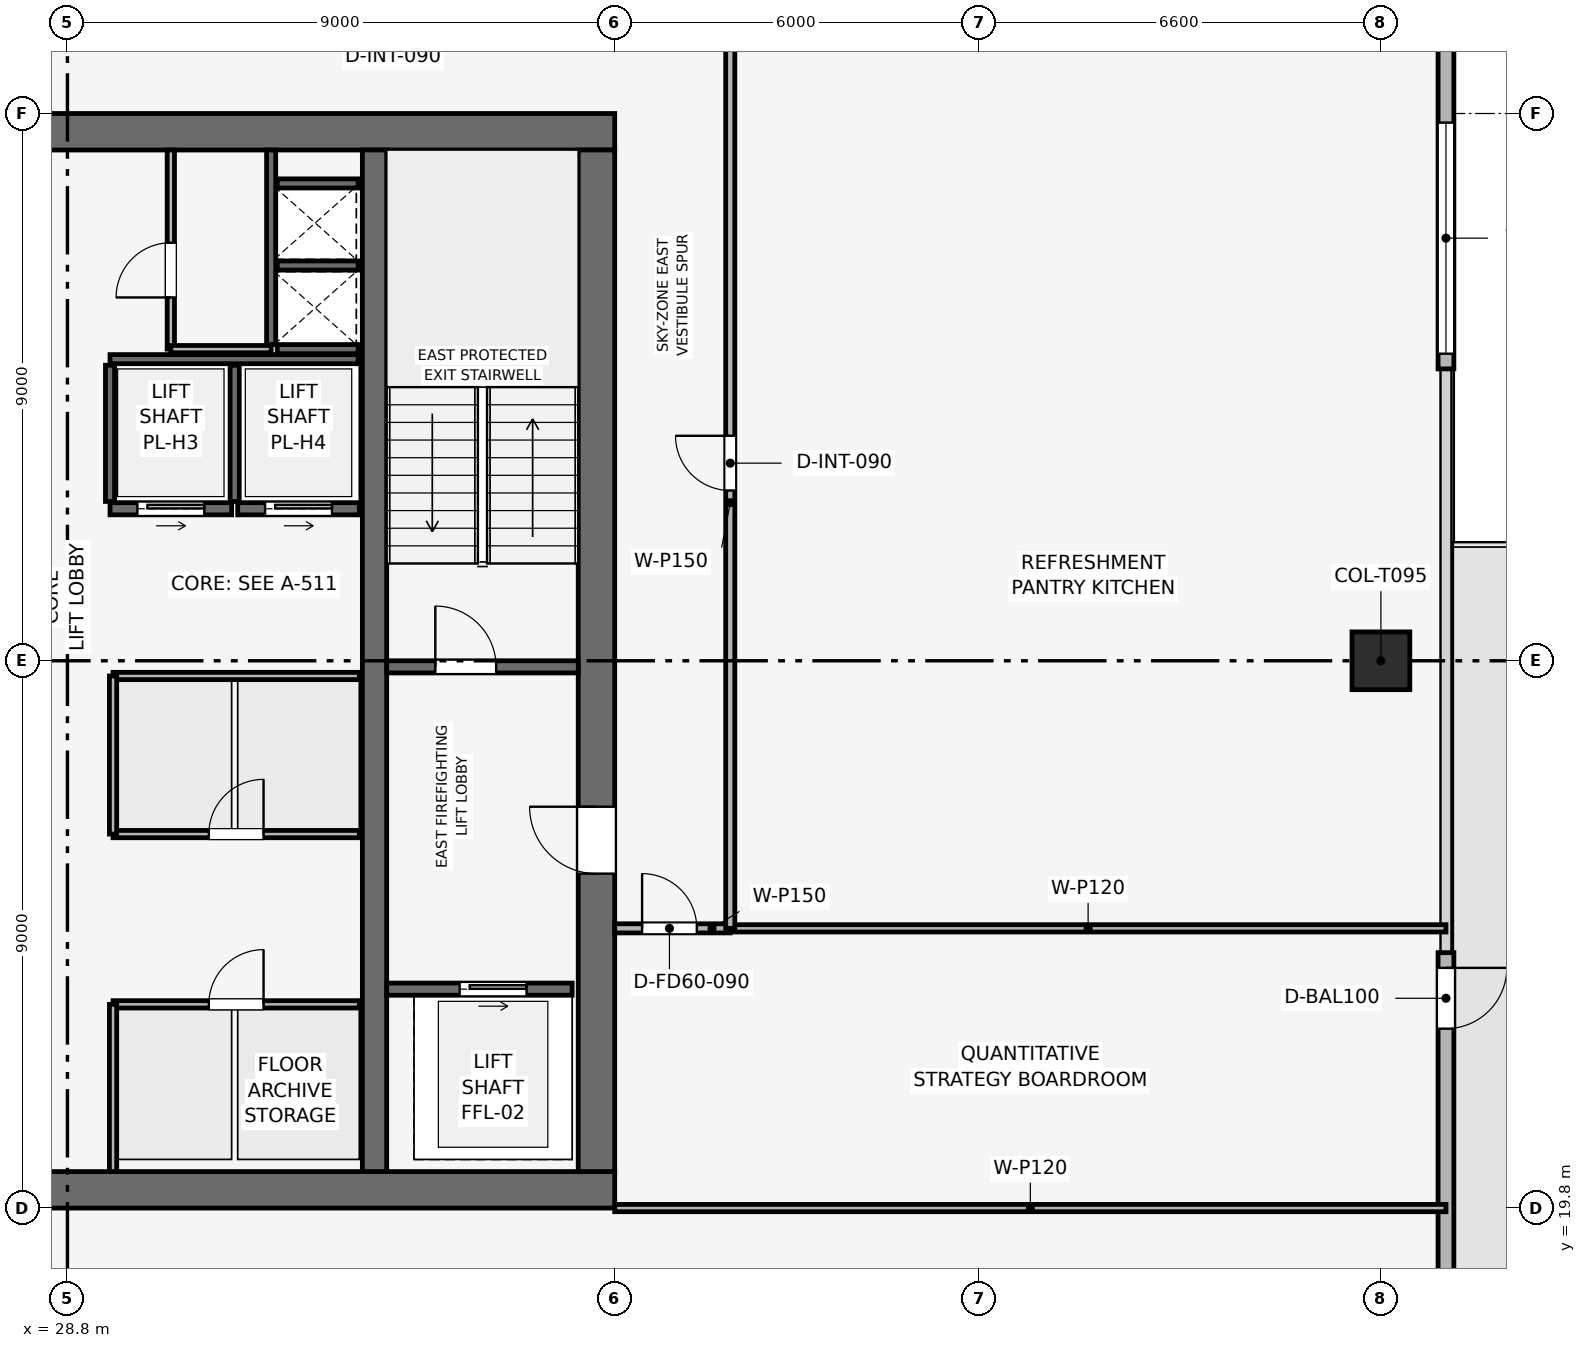
"""IFC4 building model, lengths in metres.
Left out: names, types, materials, properties, quantities, classifications, styles, units other than length and angle.
Written with IfcOpenShell. Run it as: python <this file> out.ifc"""

import sys

from ifc_helpers import new_model, si_unit, direction, frame, frame_2d, origin, origin_2d, place, context, subcontext, project, spatial, rectangle, extrude, element, fill, save


model = new_model("IFC4")
c1 = context("Model", 3, precision=1e-05, world=origin(), true_north=direction((0.0, 1.0)))
c2 = subcontext(c1, "Body", "Model", "MODEL_VIEW")
j1 = project(units=[si_unit("LENGTHUNIT", "METRE"), si_unit("PLANEANGLEUNIT", "RADIAN")], contexts=[c1])
p1 = place(None, origin())
s1 = spatial("IfcSite", under=j1, at=p1, CompositionType="ELEMENT")
p2 = place(p1, origin())
s2 = spatial("IfcBuilding", under=s1, at=p2, CompositionType="ELEMENT")
p3 = place(p2, frame((0.0, 0.0, 314.25)))
s3 = spatial("IfcBuildingStorey", under=s2, at=p3, CompositionType="ELEMENT", Elevation=314.25)
p4 = place(p3, frame((19.8, 20.1, 0.0), z_axis=(0.0, 0.0, 1.0), x_axis=(1.0, 0.0, 0.0)))
e1 = element("IfcWall", 1, at=p4, inside=s3, PredefinedType="SHEAR", context=c2, shape_type="SweptSolid", body=[
    extrude(rectangle(XDim=18.0, YDim=0.6, at=frame_2d((9.0, 0.0))), origin(), (0.0, 0.0, 1.0), 3.75),
])
p5 = place(p3, frame((19.8, 37.5, 0.0), z_axis=(0.0, 0.0, 1.0), x_axis=(1.0, 0.0, 0.0)))
e2 = element("IfcWall", 2, at=p5, inside=s3, PredefinedType="SHEAR", context=c2, shape_type="SweptSolid", body=[
    extrude(rectangle(XDim=18.0, YDim=0.6, at=frame_2d((9.0, 0.0))), origin(), (0.0, 0.0, 1.0), 3.75),
])
p6 = place(p5, frame((7.05, 0.0, 0.0)))
e3 = element("IfcOpeningElement", 3, at=p6, cuts=e2, PredefinedType="OPENING", context=c2, shape_type="SweptSolid", body=[
    extrude(rectangle(XDim=1.1, YDim=2.15, at=frame_2d((0.55, 1.075))), frame((0.0, 0.31, 0.0), z_axis=(0.0, -1.0, 0.0), x_axis=(1.0, 0.0, 0.0)), (0.0, 0.0, 1.0), 0.62),
])
p7 = place(p3, frame((37.5, 20.4, 0.0), z_axis=(0.0, 0.0, 1.0), x_axis=(0.0, 1.0, 0.0)))
e4 = element("IfcWall", 4, at=p7, inside=s3, PredefinedType="SHEAR", context=c2, shape_type="SweptSolid", body=[
    extrude(rectangle(XDim=16.8, YDim=0.6, at=frame_2d((8.4, 0.0))), origin(), (0.0, 0.0, 1.0), 3.75),
])
p8 = place(p7, frame((4.9, 0.0, 0.0)))
e5 = element("IfcOpeningElement", 5, at=p8, cuts=e4, PredefinedType="OPENING", context=c2, shape_type="SweptSolid", body=[
    extrude(rectangle(XDim=1.1, YDim=2.15, at=frame_2d((0.55, 1.075))), frame((0.0, 0.31, 0.0), z_axis=(0.0, -1.0, 0.0), x_axis=(1.0, 0.0, 0.0)), (0.0, 0.0, 1.0), 0.62),
])
p9 = place(p3, frame((33.85, 20.4, 0.0), z_axis=(0.0, 0.0, 1.0), x_axis=(0.0, 1.0, 0.0)))
e6 = element("IfcWall", 6, at=p9, inside=s3, PredefinedType="SHEAR", context=c2, shape_type="SweptSolid", body=[
    extrude(rectangle(XDim=16.8, YDim=0.4, at=frame_2d((8.4, 0.0))), origin(), (0.0, 0.0, 1.0), 3.75),
])
p10 = place(p3, frame((50.4, 28.8, 0.003), z_axis=(0.0, 0.0, 1.0), x_axis=(1.0, 0.0, 0.0)))
e7 = element("IfcColumn", 7, at=p10, inside=s3, PredefinedType="COLUMN", context=c2, shape_type="SweptSolid", body=[
    extrude(rectangle(XDim=0.95, YDim=0.95, at=origin_2d()), origin(), (0.0, 0.0, 1.0), 3.504),
])
p11 = place(p3, frame((51.47, 45.3, 0.0), z_axis=(0.0, 0.0, 1.0), x_axis=(0.0, -1.0, 0.0)))
e8 = element("IfcWall", 8, at=p11, inside=s3, PredefinedType="SOLIDWALL", context=c2, shape_type="SweptSolid", body=[
    extrude(rectangle(XDim=11.7, YDim=0.26, at=frame_2d((5.85, 0.0))), origin(), (0.0, 0.0, 1.0), 3.51),
])
p12 = place(p11, frame((7.65, 0.0, 0.9)))
e9 = element("IfcOpeningElement", 9, at=p12, cuts=e8, PredefinedType="OPENING", context=c2, shape_type="SweptSolid", body=[
    extrude(rectangle(XDim=3.8, YDim=1.9, at=frame_2d((1.9, 0.95))), frame((0.0, 0.14, 0.0), z_axis=(0.0, -1.0, 0.0), x_axis=(1.0, 0.0, 0.0)), (0.0, 0.0, 1.0), 0.28),
])
p13 = place(p3, frame((51.47, 24.0, 0.0), z_axis=(0.0, 0.0, 1.0), x_axis=(0.0, -1.0, 0.0)))
e10 = element("IfcWall", 10, at=p13, inside=s3, PredefinedType="SOLIDWALL", context=c2, shape_type="SweptSolid", body=[
    extrude(rectangle(XDim=11.7, YDim=0.26, at=frame_2d((5.85, 0.0))), origin(), (0.0, 0.0, 1.0), 3.51),
])
p14 = place(p13, frame((0.25, 0.0, 0.0)))
e11 = element("IfcOpeningElement", 11, at=p14, cuts=e10, PredefinedType="OPENING", context=c2, shape_type="SweptSolid", body=[
    extrude(rectangle(XDim=1.0, YDim=2.2, at=frame_2d((0.5, 1.1))), frame((0.0, 0.14, 0.0), z_axis=(0.0, -1.0, 0.0), x_axis=(1.0, 0.0, 0.0)), (0.0, 0.0, 1.0), 0.28),
])
p15 = place(p3, frame((34.05, 28.7, 0.0), z_axis=(0.0, 0.0, 1.0), x_axis=(1.0, 0.0, 0.0)))
e12 = element("IfcWall", 12, at=p15, inside=s3, PredefinedType="SHEAR", context=c2, shape_type="SweptSolid", body=[
    extrude(rectangle(XDim=3.15, YDim=0.2, at=frame_2d((1.575, 0.0))), origin(), (0.0, 0.0, 1.0), 3.51),
])
p16 = place(p15, frame((0.8, 0.0, 0.0)))
e13 = element("IfcOpeningElement", 13, at=p16, cuts=e12, PredefinedType="OPENING", context=c2, shape_type="SweptSolid", body=[
    extrude(rectangle(XDim=1.0, YDim=2.1, at=frame_2d((0.5, 1.05))), frame((0.0, 0.11, 0.0), z_axis=(0.0, -1.0, 0.0), x_axis=(1.0, 0.0, 0.0)), (0.0, 0.0, 1.0), 0.22),
])
p17 = place(p3, frame((32.15, 34.0, 0.0), z_axis=(0.0, 0.0, 1.0), x_axis=(0.0, 1.0, 0.0)))
e14 = element("IfcWall", 14, at=p17, inside=s3, PredefinedType="SHEAR", context=c2, shape_type="SweptSolid", body=[
    extrude(rectangle(XDim=3.2, YDim=0.15, at=frame_2d((1.6, 0.0))), origin(), (0.0, 0.0, 1.0), 3.51),
])
for number, where, z_axis, x_axis in (
    (15, (32.25, 33.925, 0.0), (0.0, 0.0, 1.0), (1.0, 0.0, 0.0)),
    (16, (32.25, 35.3, 0.0), (0.0, 0.0, 1.0), (1.0, 0.0, 0.0)),
):
    element("IfcWall", number, at=place(p3, frame(where, z_axis=z_axis, x_axis=x_axis)), inside=s3, PredefinedType="SHEAR", context=c2, shape_type="SweptSolid", body=[
        extrude(rectangle(XDim=1.33, YDim=0.15, at=frame_2d((0.665, 0.0))), origin(), (0.0, 0.0, 1.0), 3.51),
    ])
p18 = place(p3, frame((34.05, 23.4, 0.0), z_axis=(0.0, 0.0, 1.0), x_axis=(1.0, 0.0, 0.0)))
e17 = element("IfcWall", 17, at=p18, inside=s3, PredefinedType="SHEAR", context=c2, shape_type="SweptSolid", body=[
    extrude(rectangle(XDim=3.05, YDim=0.2, at=frame_2d((1.525, 0.0))), origin(), (0.0, 0.0, 1.0), 3.51),
])
p19 = place(p18, frame((1.2, 0.0, 0.0)))
e18 = element("IfcOpeningElement", 18, at=p19, cuts=e17, PredefinedType="OPENING", context=c2, shape_type="SweptSolid", body=[
    extrude(rectangle(XDim=1.1, YDim=2.15, at=frame_2d((0.55, 1.075))), frame((0.0, 0.11, 0.0), z_axis=(0.0, -1.0, 0.0), x_axis=(1.0, 0.0, 0.0)), (0.0, 0.0, 1.0), 0.22),
])
p20 = place(p3, frame((29.5, 31.3, 0.0), z_axis=(0.0, 0.0, 1.0), x_axis=(1.0, 0.0, 0.0)))
e19 = element("IfcWall", 19, at=p20, inside=s3, PredefinedType="SHEAR", context=c2, shape_type="SweptSolid", body=[
    extrude(rectangle(XDim=2.0, YDim=0.2, at=frame_2d((1.0, 0.0))), origin(), (0.0, 0.0, 1.0), 3.51),
])
p21 = place(p20, frame((0.45, 0.0, 0.0)))
e20 = element("IfcOpeningElement", 20, at=p21, cuts=e19, PredefinedType="OPENING", context=c2, shape_type="SweptSolid", body=[
    extrude(rectangle(XDim=1.1, YDim=2.15, at=frame_2d((0.55, 1.075))), frame((0.0, 0.11, 0.0), z_axis=(0.0, -1.0, 0.0), x_axis=(1.0, 0.0, 0.0)), (0.0, 0.0, 1.0), 0.22),
])
p22 = place(p3, frame((31.6, 31.3, 0.0), z_axis=(0.0, 0.0, 1.0), x_axis=(1.0, 0.0, 0.0)))
e21 = element("IfcWall", 21, at=p22, inside=s3, PredefinedType="SHEAR", context=c2, shape_type="SweptSolid", body=[
    extrude(rectangle(XDim=2.0, YDim=0.2, at=frame_2d((1.0, 0.0))), origin(), (0.0, 0.0, 1.0), 3.51),
])
p23 = place(p22, frame((0.45, 0.0, 0.0)))
e22 = element("IfcOpeningElement", 22, at=p23, cuts=e21, PredefinedType="OPENING", context=c2, shape_type="SweptSolid", body=[
    extrude(rectangle(XDim=1.1, YDim=2.15, at=frame_2d((0.55, 1.075))), frame((0.0, 0.11, 0.0), z_axis=(0.0, -1.0, 0.0), x_axis=(1.0, 0.0, 0.0)), (0.0, 0.0, 1.0), 0.22),
])
p24 = place(p3, frame((32.25, 36.65, 0.0), z_axis=(0.0, 0.0, 1.0), x_axis=(1.0, 0.0, 0.0)))
e23 = element("IfcWall", 23, at=p24, inside=s3, PredefinedType="SHEAR", context=c2, shape_type="SweptSolid", body=[
    extrude(rectangle(XDim=1.33, YDim=0.15, at=frame_2d((0.665, 0.0))), origin(), (0.0, 0.0, 1.0), 3.51),
])
p25 = place(p3, frame((29.5, 33.76, 0.0), z_axis=(0.0, 0.0, 1.0), x_axis=(1.0, 0.0, 0.0)))
e24 = element("IfcWall", 24, at=p25, inside=s3, PredefinedType="SHEAR", context=c2, shape_type="SweptSolid", body=[
    extrude(rectangle(XDim=4.08, YDim=0.15, at=frame_2d((2.04, 0.0))), origin(), (0.0, 0.0, 1.0), 3.51),
])
for number, where, z_axis, x_axis in (
    (25, (29.5, 31.42, 0.0), (0.0, 0.0, 1.0), (0.0, 1.0, 0.0)),
    (26, (31.55, 31.42, 0.0), (0.0, 0.0, 1.0), (0.0, 1.0, 0.0)),
):
    element("IfcWall", number, at=place(p3, frame(where, z_axis=z_axis, x_axis=x_axis)), inside=s3, PredefinedType="SHEAR", context=c2, shape_type="SweptSolid", body=[
        extrude(rectangle(XDim=2.24, YDim=0.15, at=frame_2d((1.12, 0.0))), origin(), (0.0, 0.0, 1.0), 3.51),
    ])
p26 = place(p3, frame((30.5, 33.925, 0.0), z_axis=(0.0, 0.0, 1.0), x_axis=(0.0, 1.0, 0.0)))
e27 = element("IfcWall", 27, at=p26, inside=s3, PredefinedType="PARTITIONING", context=c2, shape_type="SweptSolid", body=[
    extrude(rectangle(XDim=3.275, YDim=0.12, at=frame_2d((1.637, 0.0))), origin(), (0.0, 0.0, 1.0), 3.51),
])
p27 = place(p26, frame((0.85, 0.0, 0.0)))
e28 = element("IfcOpeningElement", 28, at=p27, cuts=e27, PredefinedType="OPENING", context=c2, shape_type="SweptSolid", body=[
    extrude(rectangle(XDim=0.9, YDim=2.1, at=frame_2d((0.45, 1.05))), frame((0.0, 0.07, 0.0), z_axis=(0.0, -1.0, 0.0), x_axis=(1.0, 0.0, 0.0)), (0.0, 0.0, 1.0), 0.14),
])
p28 = place(p3, frame((30.5, 33.925, 0.0), z_axis=(0.0, 0.0, 1.0), x_axis=(1.0, 0.0, 0.0)))
e29 = element("IfcWall", 29, at=p28, inside=s3, PredefinedType="PARTITIONING", context=c2, shape_type="SweptSolid", body=[
    extrude(rectangle(XDim=1.65, YDim=0.12, at=frame_2d((0.825, 0.0))), origin(), (0.0, 0.0, 1.0), 3.51),
])
p29 = place(p3, frame((29.55, 23.15, 0.0), z_axis=(0.0, 0.0, 1.0), x_axis=(1.0, 0.0, 0.0)))
e30 = element("IfcWall", 30, at=p29, inside=s3, PredefinedType="PARTITIONING", context=c2, shape_type="SweptSolid", body=[
    extrude(rectangle(XDim=4.05, YDim=0.12, at=frame_2d((2.025, 0.0))), origin(), (0.0, 0.0, 1.0), 3.51),
])
p30 = place(p29, frame((1.575, 0.0, 0.0)))
e31 = element("IfcOpeningElement", 31, at=p30, cuts=e30, PredefinedType="OPENING", context=c2, shape_type="SweptSolid", body=[
    extrude(rectangle(XDim=0.9, YDim=2.1, at=frame_2d((0.45, 1.05))), frame((0.0, 0.07, 0.0), z_axis=(0.0, -1.0, 0.0), x_axis=(1.0, 0.0, 0.0)), (0.0, 0.0, 1.0), 0.14),
])
p31 = place(p3, frame((29.55, 20.4, 0.0), z_axis=(0.0, 0.0, 1.0), x_axis=(0.0, 1.0, 0.0)))
e32 = element("IfcWall", 32, at=p31, inside=s3, PredefinedType="PARTITIONING", context=c2, shape_type="SweptSolid", body=[
    extrude(rectangle(XDim=2.75, YDim=0.12, at=frame_2d((1.375, 0.0))), origin(), (0.0, 0.0, 1.0), 3.51),
])
p32 = place(p3, frame((29.55, 25.95, 0.0), z_axis=(0.0, 0.0, 1.0), x_axis=(1.0, 0.0, 0.0)))
e33 = element("IfcWall", 33, at=p32, inside=s3, PredefinedType="PARTITIONING", context=c2, shape_type="SweptSolid", body=[
    extrude(rectangle(XDim=4.05, YDim=0.12, at=frame_2d((2.025, 0.0))), origin(), (0.0, 0.0, 1.0), 3.51),
])
p33 = place(p32, frame((1.575, 0.0, 0.0)))
e34 = element("IfcOpeningElement", 34, at=p33, cuts=e33, PredefinedType="OPENING", context=c2, shape_type="SweptSolid", body=[
    extrude(rectangle(XDim=0.9, YDim=2.1, at=frame_2d((0.45, 1.05))), frame((0.0, 0.07, 0.0), z_axis=(0.0, -1.0, 0.0), x_axis=(1.0, 0.0, 0.0)), (0.0, 0.0, 1.0), 0.14),
])
p34 = place(p3, frame((29.55, 28.55, 0.0), z_axis=(0.0, 0.0, 1.0), x_axis=(1.0, 0.0, 0.0)))
e35 = element("IfcWall", 35, at=p34, inside=s3, PredefinedType="PARTITIONING", context=c2, shape_type="SweptSolid", body=[
    extrude(rectangle(XDim=4.05, YDim=0.12, at=frame_2d((2.025, 0.0))), origin(), (0.0, 0.0, 1.0), 3.51),
])
p35 = place(p3, frame((29.55, 25.95, 0.0), z_axis=(0.0, 0.0, 1.0), x_axis=(0.0, 1.0, 0.0)))
e36 = element("IfcWall", 36, at=p35, inside=s3, PredefinedType="PARTITIONING", context=c2, shape_type="SweptSolid", body=[
    extrude(rectangle(XDim=2.6, YDim=0.12, at=frame_2d((1.3, 0.0))), origin(), (0.0, 0.0, 1.0), 3.51),
])
p36 = place(p3, frame((37.8, 19.8, 0.0), z_axis=(0.0, 0.0, 1.0), x_axis=(1.0, 0.0, 0.0)))
e37 = element("IfcWall", 37, at=p36, inside=s3, PredefinedType="PARTITIONING", context=c2, shape_type="SweptSolid", body=[
    extrude(rectangle(XDim=13.67, YDim=0.12, at=frame_2d((6.835, 0.0))), origin(), (0.0, 0.0, 1.0), 3.095),
])
p37 = place(p3, frame((37.8, 24.4, 0.0), z_axis=(0.0, 0.0, 1.0), x_axis=(1.0, 0.0, 0.0)))
e38 = element("IfcWall", 38, at=p37, inside=s3, PredefinedType="PARTITIONING", context=c2, shape_type="SweptSolid", body=[
    extrude(rectangle(XDim=1.9, YDim=0.15, at=frame_2d((0.95, 0.0))), origin(), (0.0, 0.0, 1.0), 3.51),
])
p38 = place(p37, frame((0.45, 0.0, 0.0)))
e39 = element("IfcOpeningElement", 39, at=p38, cuts=e38, PredefinedType="OPENING", context=c2, shape_type="SweptSolid", body=[
    extrude(rectangle(XDim=0.9, YDim=2.1, at=frame_2d((0.45, 1.05))), frame((0.0, 0.085, 0.0), z_axis=(0.0, -1.0, 0.0), x_axis=(1.0, 0.0, 0.0)), (0.0, 0.0, 1.0), 0.17),
])
p39 = place(p3, frame((39.7, 24.4, 0.0), z_axis=(0.0, 0.0, 1.0), x_axis=(1.0, 0.0, 0.0)))
e40 = element("IfcWall", 40, at=p39, inside=s3, PredefinedType="PARTITIONING", context=c2, shape_type="SweptSolid", body=[
    extrude(rectangle(XDim=11.77, YDim=0.12, at=frame_2d((5.885, 0.0))), origin(), (0.0, 0.0, 1.0), 3.135),
])
p40 = place(p3, frame((39.7, 24.4, 0.0), z_axis=(0.0, 0.0, 1.0), x_axis=(0.0, 1.0, 0.0)))
e41 = element("IfcWall", 41, at=p40, inside=s3, PredefinedType="PARTITIONING", context=c2, shape_type="SweptSolid", body=[
    extrude(rectangle(XDim=15.3, YDim=0.15, at=frame_2d((7.65, 0.0))), origin(), (0.0, 0.0, 1.0), 3.095),
])
p41 = place(p40, frame((7.2, 0.0, 0.0)))
e42 = element("IfcOpeningElement", 42, at=p41, cuts=e41, PredefinedType="OPENING", context=c2, shape_type="SweptSolid", body=[
    extrude(rectangle(XDim=0.9, YDim=2.1, at=frame_2d((0.45, 1.05))), frame((0.0, 0.085, 0.0), z_axis=(0.0, -1.0, 0.0), x_axis=(1.0, 0.0, 0.0)), (0.0, 0.0, 1.0), 0.17),
])
p42 = place(p14, origin())
e43 = element("IfcDoor", 43, at=p42, inside=s3, OperationType="SINGLE_SWING_LEFT", PredefinedType="DOOR", context=c2, shape_type="SweptSolid", body=[
    extrude(rectangle(XDim=1.0, YDim=2.2, at=frame_2d((0.5, 1.1))), frame((0.0, 0.025, 0.0), z_axis=(0.0, -1.0, 0.0), x_axis=(1.0, 0.0, 0.0)), (0.0, 0.0, 1.0), 0.05),
])
fill(e11, e43)
p43 = place(p12, origin())
e44 = element("IfcWindow", 44, at=p43, inside=s3, PartitioningType="SINGLE_PANEL", PredefinedType="WINDOW", context=c2, shape_type="SweptSolid", body=[
    extrude(rectangle(XDim=3.8, YDim=1.9, at=frame_2d((1.9, 0.95))), frame((0.0, 0.03, 0.0), z_axis=(0.0, -1.0, 0.0), x_axis=(1.0, 0.0, 0.0)), (0.0, 0.0, 1.0), 0.06),
])
fill(e9, e44)
p44 = place(p16, origin())
e45 = element("IfcDoor", 45, at=p44, inside=s3, OperationType="SINGLE_SWING_LEFT", PredefinedType="DOOR", context=c2, shape_type="SweptSolid", body=[
    extrude(rectangle(XDim=1.0, YDim=2.1, at=frame_2d((0.5, 1.05))), frame((0.0, 0.025, 0.0), z_axis=(0.0, -1.0, 0.0), x_axis=(1.0, 0.0, 0.0)), (0.0, 0.0, 1.0), 0.05),
])
fill(e13, e45)
p45 = place(p19, origin())
e46 = element("IfcDoor", 46, at=p45, inside=s3, OperationType="SLIDING_TO_RIGHT", PredefinedType="DOOR", context=c2, shape_type="SweptSolid", body=[
    extrude(rectangle(XDim=1.1, YDim=2.15, at=frame_2d((0.55, 1.075))), frame((0.0, 0.025, 0.0), z_axis=(0.0, -1.0, 0.0), x_axis=(1.0, 0.0, 0.0)), (0.0, 0.0, 1.0), 0.05),
])
fill(e18, e46)
p46 = place(p21, origin())
e47 = element("IfcDoor", 47, at=p46, inside=s3, OperationType="SLIDING_TO_RIGHT", PredefinedType="DOOR", context=c2, shape_type="SweptSolid", body=[
    extrude(rectangle(XDim=1.1, YDim=2.15, at=frame_2d((0.55, 1.075))), frame((0.0, 0.025, 0.0), z_axis=(0.0, -1.0, 0.0), x_axis=(1.0, 0.0, 0.0)), (0.0, 0.0, 1.0), 0.05),
])
fill(e20, e47)
p47 = place(p23, origin())
e48 = element("IfcDoor", 48, at=p47, inside=s3, OperationType="SLIDING_TO_RIGHT", PredefinedType="DOOR", context=c2, shape_type="SweptSolid", body=[
    extrude(rectangle(XDim=1.1, YDim=2.15, at=frame_2d((0.55, 1.075))), frame((0.0, 0.025, 0.0), z_axis=(0.0, -1.0, 0.0), x_axis=(1.0, 0.0, 0.0)), (0.0, 0.0, 1.0), 0.05),
])
fill(e22, e48)
p48 = place(p27, origin())
e49 = element("IfcDoor", 49, at=p48, inside=s3, OperationType="SINGLE_SWING_LEFT", PredefinedType="DOOR", context=c2, shape_type="SweptSolid", body=[
    extrude(rectangle(XDim=0.9, YDim=2.1, at=frame_2d((0.45, 1.05))), frame((0.0, 0.025, 0.0), z_axis=(0.0, -1.0, 0.0), x_axis=(1.0, 0.0, 0.0)), (0.0, 0.0, 1.0), 0.05),
])
fill(e28, e49)
p49 = place(p30, origin())
e50 = element("IfcDoor", 50, at=p49, inside=s3, OperationType="SINGLE_SWING_RIGHT", PredefinedType="DOOR", context=c2, shape_type="SweptSolid", body=[
    extrude(rectangle(XDim=0.9, YDim=2.1, at=frame_2d((0.45, 1.05))), frame((0.0, 0.025, 0.0), z_axis=(0.0, -1.0, 0.0), x_axis=(1.0, 0.0, 0.0)), (0.0, 0.0, 1.0), 0.05),
])
fill(e31, e50)
p50 = place(p33, origin())
e51 = element("IfcDoor", 51, at=p50, inside=s3, OperationType="SINGLE_SWING_RIGHT", PredefinedType="DOOR", context=c2, shape_type="SweptSolid", body=[
    extrude(rectangle(XDim=0.9, YDim=2.1, at=frame_2d((0.45, 1.05))), frame((0.0, 0.025, 0.0), z_axis=(0.0, -1.0, 0.0), x_axis=(1.0, 0.0, 0.0)), (0.0, 0.0, 1.0), 0.05),
])
fill(e34, e51)
p51 = place(p38, origin())
e52 = element("IfcDoor", 52, at=p51, inside=s3, OperationType="SINGLE_SWING_LEFT", PredefinedType="DOOR", context=c2, shape_type="SweptSolid", body=[
    extrude(rectangle(XDim=0.9, YDim=2.1, at=frame_2d((0.45, 1.05))), frame((0.0, 0.025, 0.0), z_axis=(0.0, -1.0, 0.0), x_axis=(1.0, 0.0, 0.0)), (0.0, 0.0, 1.0), 0.05),
])
fill(e39, e52)
p52 = place(p41, origin())
e53 = element("IfcDoor", 53, at=p52, inside=s3, OperationType="SINGLE_SWING_RIGHT", PredefinedType="DOOR", context=c2, shape_type="SweptSolid", body=[
    extrude(rectangle(XDim=0.9, YDim=2.1, at=frame_2d((0.45, 1.05))), frame((0.0, 0.025, 0.0), z_axis=(0.0, -1.0, 0.0), x_axis=(1.0, 0.0, 0.0)), (0.0, 0.0, 1.0), 0.05),
])
fill(e42, e53)
p53 = place(p8, origin())
e54 = element("IfcDoor", 54, at=p53, inside=s3, OperationType="SINGLE_SWING_RIGHT", PredefinedType="DOOR", context=c2, shape_type="SweptSolid", body=[
    extrude(rectangle(XDim=1.1, YDim=2.15, at=frame_2d((0.55, 1.075))), frame((0.0, 0.025, 0.0), z_axis=(0.0, -1.0, 0.0), x_axis=(1.0, 0.0, 0.0)), (0.0, 0.0, 1.0), 0.05),
])
fill(e5, e54)
save(model, sys.argv[1])
